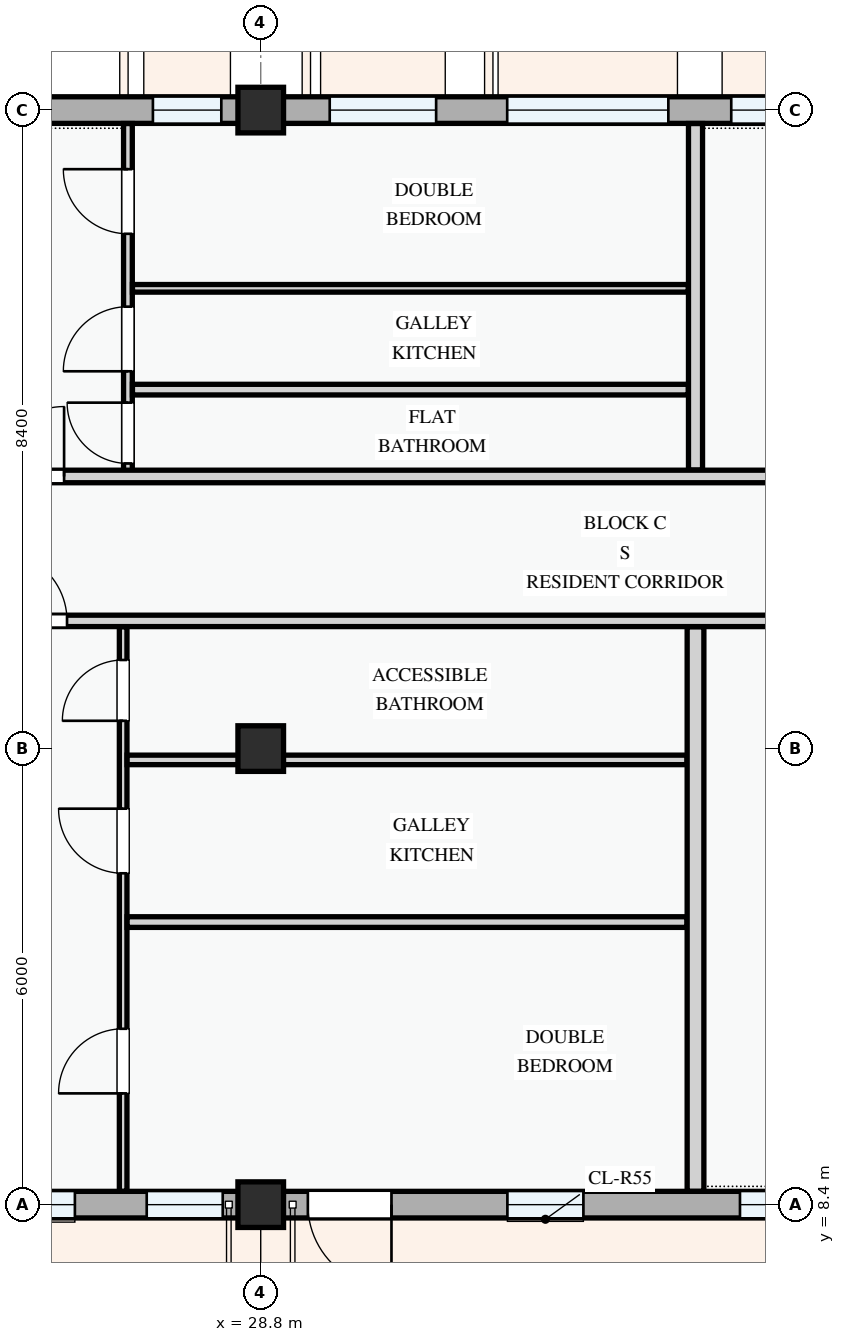
"""IFC4 building model, lengths in metres.
Left out: names, types, materials, properties, quantities, classifications, styles, units other than length and angle.
Written with IfcOpenShell. Run it as: python <this file> out.ifc"""

import sys

from ifc_helpers import new_model, si_unit, direction, frame, frame_2d, origin, origin_2d, place, context, subcontext, project, spatial, rectangle, extrude, element, fill, save


model = new_model("IFC4")
c1 = context("Model", 3, precision=1e-05, world=origin(), true_north=direction((0.0, 1.0)))
c2 = subcontext(c1, "Body", "Model", "MODEL_VIEW")
j1 = project(units=[si_unit("LENGTHUNIT", "METRE"), si_unit("PLANEANGLEUNIT", "RADIAN")], contexts=[c1])
p1 = place(None, origin())
s1 = spatial("IfcSite", under=j1, at=p1, CompositionType="ELEMENT")
p2 = place(p1, origin())
s2 = spatial("IfcBuilding", under=s1, at=p2, CompositionType="ELEMENT")
p3 = place(p2, frame((0.0, 0.0, 8.1)))
s3 = spatial("IfcBuildingStorey", under=s2, at=p3, CompositionType="ELEMENT", Elevation=8.1)
for number, where, z_axis, x_axis in (
    (1, (28.8, 8.4, 0.0), (0.0, 0.0, 1.0), (1.0, 0.0, 0.0)),
    (2, (28.8, 14.4, 0.0), (0.0, 0.0, 1.0), (1.0, 0.0, 0.0)),
    (3, (28.8, 22.8, 0.0), (0.0, 0.0, 1.0), (1.0, 0.0, 0.0)),
):
    element("IfcColumn", number, at=place(p3, frame(where, z_axis=z_axis, x_axis=x_axis)), inside=s3, PredefinedType="COLUMN", context=c2, shape_type="SweptSolid", body=[
        extrude(rectangle(XDim=0.6, YDim=0.6, at=origin_2d()), origin(), (0.0, 0.0, 1.0), 3.3),
    ])
p4 = place(p3, frame((22.8, 8.4, 0.0), z_axis=(0.0, 0.0, 1.0), x_axis=(1.0, 0.0, 0.0)))
e4 = element("IfcWall", 4, at=p4, inside=s3, PredefinedType="STANDARD", context=c2, shape_type="SweptSolid", body=[
    extrude(rectangle(XDim=6.0, YDim=0.35, at=frame_2d((3.0, 0.0))), origin(), (0.0, 0.0, 1.0), 2.475),
])
p5 = place(p4, frame((0.62, 0.0, 0.0)))
e5 = element("IfcOpeningElement", 5, at=p5, cuts=e4, PredefinedType="OPENING", context=c2, shape_type="SweptSolid", body=[
    extrude(rectangle(XDim=1.05, YDim=2.15, at=frame_2d((0.525, 1.075))), frame((0.0, 0.185, 0.0), z_axis=(0.0, -1.0, 0.0), x_axis=(1.0, 0.0, 0.0)), (0.0, 0.0, 1.0), 0.37),
])
p6 = place(p4, frame((2.355, 0.0, 0.78)))
e6 = element("IfcOpeningElement", 6, at=p6, cuts=e4, PredefinedType="OPENING", context=c2, shape_type="SweptSolid", body=[
    extrude(rectangle(XDim=1.2, YDim=1.5, at=frame_2d((0.6, 0.75))), frame((0.0, 0.185, 0.0), z_axis=(0.0, -1.0, 0.0), x_axis=(1.0, 0.0, 0.0)), (0.0, 0.0, 1.0), 0.37),
])
p7 = place(p4, frame((4.5, 0.0, 0.78)))
e7 = element("IfcOpeningElement", 7, at=p7, cuts=e4, PredefinedType="OPENING", context=c2, shape_type="SweptSolid", body=[
    extrude(rectangle(XDim=1.0, YDim=1.25, at=frame_2d((0.5, 0.625))), frame((0.0, 0.185, 0.0), z_axis=(0.0, -1.0, 0.0), x_axis=(1.0, 0.0, 0.0)), (0.0, 0.0, 1.0), 0.37),
])
p8 = place(p3, frame((28.8, 8.4, 0.0), z_axis=(0.0, 0.0, 1.0), x_axis=(1.0, 0.0, 0.0)))
e8 = element("IfcWall", 8, at=p8, inside=s3, PredefinedType="STANDARD", context=c2, shape_type="SweptSolid", body=[
    extrude(rectangle(XDim=8.4, YDim=0.35, at=frame_2d((4.2, 0.0))), origin(), (0.0, 0.0, 1.0), 2.375),
])
p9 = place(p8, frame((0.62, 0.0, 0.0)))
e9 = element("IfcOpeningElement", 9, at=p9, cuts=e8, PredefinedType="OPENING", context=c2, shape_type="SweptSolid", body=[
    extrude(rectangle(XDim=1.1, YDim=2.15, at=frame_2d((0.55, 1.075))), frame((0.0, 0.185, 0.0), z_axis=(0.0, -1.0, 0.0), x_axis=(1.0, 0.0, 0.0)), (0.0, 0.0, 1.0), 0.37),
])
p10 = place(p8, frame((3.245, 0.0, 0.78)))
e10 = element("IfcOpeningElement", 10, at=p10, cuts=e8, PredefinedType="OPENING", context=c2, shape_type="SweptSolid", body=[
    extrude(rectangle(XDim=1.0, YDim=1.25, at=frame_2d((0.5, 0.625))), frame((0.0, 0.185, 0.0), z_axis=(0.0, -1.0, 0.0), x_axis=(1.0, 0.0, 0.0)), (0.0, 0.0, 1.0), 0.37),
])
p11 = place(p8, frame((6.305, 0.0, 0.78)))
e11 = element("IfcOpeningElement", 11, at=p11, cuts=e8, PredefinedType="OPENING", context=c2, shape_type="SweptSolid", body=[
    extrude(rectangle(XDim=1.32, YDim=1.35, at=frame_2d((0.66, 0.675))), frame((0.0, 0.185, 0.0), z_axis=(0.0, -1.0, 0.0), x_axis=(1.0, 0.0, 0.0)), (0.0, 0.0, 1.0), 0.37),
])
p12 = place(p3, frame((37.2, 22.8, 0.0), z_axis=(0.0, 0.0, 1.0), x_axis=(-1.0, 0.0, 0.0)))
e12 = element("IfcWall", 12, at=p12, inside=s3, PredefinedType="STANDARD", context=c2, shape_type="SweptSolid", body=[
    extrude(rectangle(XDim=8.4, YDim=0.35, at=frame_2d((4.2, 0.0))), origin(), (0.0, 0.0, 1.0), 2.375),
])
p13 = place(p12, frame((0.66, 0.0, 0.78)))
e13 = element("IfcOpeningElement", 13, at=p13, cuts=e12, PredefinedType="OPENING", context=c2, shape_type="SweptSolid", body=[
    extrude(rectangle(XDim=1.55, YDim=1.4, at=frame_2d((0.775, 0.7))), frame((0.0, 0.185, 0.0), z_axis=(0.0, -1.0, 0.0), x_axis=(1.0, 0.0, 0.0)), (0.0, 0.0, 1.0), 0.37),
])
p14 = place(p12, frame((3.038, 0.0, 0.78)))
e14 = element("IfcOpeningElement", 14, at=p14, cuts=e12, PredefinedType="OPENING", context=c2, shape_type="SweptSolid", body=[
    extrude(rectangle(XDim=2.12, YDim=1.44, at=frame_2d((1.06, 0.72))), frame((0.0, 0.185, 0.0), z_axis=(0.0, -1.0, 0.0), x_axis=(1.0, 0.0, 0.0)), (0.0, 0.0, 1.0), 0.37),
])
p15 = place(p12, frame((6.093, 0.0, 0.78)))
e15 = element("IfcOpeningElement", 15, at=p15, cuts=e12, PredefinedType="OPENING", context=c2, shape_type="SweptSolid", body=[
    extrude(rectangle(XDim=1.4, YDim=1.45, at=frame_2d((0.7, 0.725))), frame((0.0, 0.185, 0.0), z_axis=(0.0, -1.0, 0.0), x_axis=(1.0, 0.0, 0.0)), (0.0, 0.0, 1.0), 0.37),
])
p16 = place(p3, frame((28.8, 22.8, 0.0), z_axis=(0.0, 0.0, 1.0), x_axis=(-1.0, 0.0, 0.0)))
e16 = element("IfcWall", 16, at=p16, inside=s3, PredefinedType="STANDARD", context=c2, shape_type="SweptSolid", body=[
    extrude(rectangle(XDim=6.0, YDim=0.35, at=frame_2d((3.0, 0.0))), origin(), (0.0, 0.0, 1.0), 2.475),
])
p17 = place(p16, frame((0.519, 0.0, 0.78)))
e17 = element("IfcOpeningElement", 17, at=p17, cuts=e16, PredefinedType="OPENING", context=c2, shape_type="SweptSolid", body=[
    extrude(rectangle(XDim=0.9, YDim=1.2, at=frame_2d((0.45, 0.6))), frame((0.0, 0.185, 0.0), z_axis=(0.0, -1.0, 0.0), x_axis=(1.0, 0.0, 0.0)), (0.0, 0.0, 1.0), 0.37),
])
p18 = place(p16, frame((3.004, 0.0, 0.78)))
e18 = element("IfcOpeningElement", 18, at=p18, cuts=e16, PredefinedType="OPENING", context=c2, shape_type="SweptSolid", body=[
    extrude(rectangle(XDim=1.55, YDim=1.4, at=frame_2d((0.775, 0.7))), frame((0.0, 0.185, 0.0), z_axis=(0.0, -1.0, 0.0), x_axis=(1.0, 0.0, 0.0)), (0.0, 0.0, 1.0), 0.37),
])
p19 = place(p3, frame((26.99, 8.577, 0.0), z_axis=(0.0, 0.0, 1.0), x_axis=(0.0, 1.0, 0.0)))
e19 = element("IfcWall", 19, at=p19, inside=s3, PredefinedType="PARTITIONING", context=c2, shape_type="SweptSolid", body=[
    extrude(rectangle(XDim=7.426, YDim=0.1, at=frame_2d((3.713, 0.0))), origin(), (0.0, 0.0, 1.0), 3.0),
])
p20 = place(p19, frame((1.287, 0.0, 0.0)))
e20 = element("IfcOpeningElement", 20, at=p20, cuts=e19, PredefinedType="OPENING", context=c2, shape_type="SweptSolid", body=[
    extrude(rectangle(XDim=0.85, YDim=2.1, at=frame_2d((0.425, 1.05))), frame((0.0, 0.06, 0.0), z_axis=(0.0, -1.0, 0.0), x_axis=(1.0, 0.0, 0.0)), (0.0, 0.0, 1.0), 0.12),
])
p21 = place(p19, frame((4.182, 0.0, 0.0)))
e21 = element("IfcOpeningElement", 21, at=p21, cuts=e19, PredefinedType="OPENING", context=c2, shape_type="SweptSolid", body=[
    extrude(rectangle(XDim=0.85, YDim=2.1, at=frame_2d((0.425, 1.05))), frame((0.0, 0.06, 0.0), z_axis=(0.0, -1.0, 0.0), x_axis=(1.0, 0.0, 0.0)), (0.0, 0.0, 1.0), 0.12),
])
p22 = place(p19, frame((6.189, 0.0, 0.0)))
e22 = element("IfcOpeningElement", 22, at=p22, cuts=e19, PredefinedType="OPENING", context=c2, shape_type="SweptSolid", body=[
    extrude(rectangle(XDim=0.8, YDim=2.1, at=frame_2d((0.4, 1.05))), frame((0.0, 0.06, 0.0), z_axis=(0.0, -1.0, 0.0), x_axis=(1.0, 0.0, 0.0)), (0.0, 0.0, 1.0), 0.12),
])
p23 = place(p3, frame((27.042, 12.118, 0.0), z_axis=(0.0, 0.0, 1.0), x_axis=(1.0, 0.0, 0.0)))
e23 = element("IfcWall", 23, at=p23, inside=s3, PredefinedType="PARTITIONING", context=c2, shape_type="SweptSolid", body=[
    extrude(rectangle(XDim=7.366, YDim=0.14, at=frame_2d((3.683, 0.0))), origin(), (0.0, 0.0, 1.0), 3.0),
])
p24 = place(p3, frame((27.042, 14.251, 0.0), z_axis=(0.0, 0.0, 1.0), x_axis=(1.0, 0.0, 0.0)))
e24 = element("IfcWall", 24, at=p24, inside=s3, PredefinedType="PARTITIONING", context=c2, shape_type="SweptSolid", body=[
    extrude(rectangle(XDim=7.366, YDim=0.125, at=frame_2d((3.683, 0.0))), origin(), (0.0, 0.0, 1.0), 2.375),
])
p25 = place(p3, frame((27.053, 17.98, 0.0), z_axis=(0.0, 0.0, 1.0), x_axis=(0.0, 1.0, 0.0)))
e25 = element("IfcWall", 25, at=p25, inside=s3, PredefinedType="PARTITIONING", context=c2, shape_type="SweptSolid", body=[
    extrude(rectangle(XDim=4.643, YDim=0.115, at=frame_2d((2.322, 0.0))), origin(), (0.0, 0.0, 1.0), 3.0),
])
p26 = place(p25, frame((0.171, 0.0, 0.0)))
e26 = element("IfcOpeningElement", 26, at=p26, cuts=e25, PredefinedType="OPENING", context=c2, shape_type="SweptSolid", body=[
    extrude(rectangle(XDim=0.8, YDim=2.1, at=frame_2d((0.4, 1.05))), frame((0.0, 0.067, 0.0), z_axis=(0.0, -1.0, 0.0), x_axis=(1.0, 0.0, 0.0)), (0.0, 0.0, 1.0), 0.135),
])
p27 = place(p25, frame((1.384, 0.0, 0.0)))
e27 = element("IfcOpeningElement", 27, at=p27, cuts=e25, PredefinedType="OPENING", context=c2, shape_type="SweptSolid", body=[
    extrude(rectangle(XDim=0.85, YDim=2.1, at=frame_2d((0.425, 1.05))), frame((0.0, 0.067, 0.0), z_axis=(0.0, -1.0, 0.0), x_axis=(1.0, 0.0, 0.0)), (0.0, 0.0, 1.0), 0.135),
])
p28 = place(p25, frame((3.193, 0.0, 0.0)))
e28 = element("IfcOpeningElement", 28, at=p28, cuts=e25, PredefinedType="OPENING", context=c2, shape_type="SweptSolid", body=[
    extrude(rectangle(XDim=0.85, YDim=2.1, at=frame_2d((0.425, 1.05))), frame((0.0, 0.067, 0.0), z_axis=(0.0, -1.0, 0.0), x_axis=(1.0, 0.0, 0.0)), (0.0, 0.0, 1.0), 0.135),
])
p29 = place(p3, frame((27.112, 20.455, 0.0), z_axis=(0.0, 0.0, 1.0), x_axis=(1.0, 0.0, 0.0)))
e29 = element("IfcWall", 29, at=p29, inside=s3, PredefinedType="PARTITIONING", context=c2, shape_type="SweptSolid", body=[
    extrude(rectangle(XDim=7.313, YDim=0.1, at=frame_2d((3.657, 0.0))), origin(), (0.0, 0.0, 1.0), 3.0),
])
p30 = place(p3, frame((27.112, 19.122, 0.0), z_axis=(0.0, 0.0, 1.0), x_axis=(1.0, 0.0, 0.0)))
e30 = element("IfcWall", 30, at=p30, inside=s3, PredefinedType="PARTITIONING", context=c2, shape_type="SweptSolid", body=[
    extrude(rectangle(XDim=7.313, YDim=0.14, at=frame_2d((3.657, 0.0))), origin(), (0.0, 0.0, 1.0), 3.0),
])
p31 = place(p3, frame((34.52, 8.577, 0.0), z_axis=(0.0, 0.0, 1.0), x_axis=(0.0, 1.0, 0.0)))
e31 = element("IfcWall", 31, at=p31, inside=s3, PredefinedType="PARTITIONING", context=c2, shape_type="SweptSolid", body=[
    extrude(rectangle(XDim=7.426, YDim=0.22, at=frame_2d((3.713, 0.0))), origin(), (0.0, 0.0, 1.0), 3.0),
])
p32 = place(p3, frame((34.52, 18.064, 0.0), z_axis=(0.0, 0.0, 1.0), x_axis=(0.0, 1.0, 0.0)))
e32 = element("IfcWall", 32, at=p32, inside=s3, PredefinedType="PARTITIONING", context=c2, shape_type="SweptSolid", body=[
    extrude(rectangle(XDim=4.559, YDim=0.185, at=frame_2d((2.279, 0.0))), origin(), (0.0, 0.0, 1.0), 3.0),
])
p33 = place(p3, frame((22.66, 16.08, 0.0), z_axis=(0.0, 0.0, 1.0), x_axis=(1.0, 0.0, 0.0)))
e33 = element("IfcWall", 33, at=p33, inside=s3, PredefinedType="PARTITIONING", context=c2, shape_type="SweptSolid", body=[
    extrude(rectangle(XDim=34.763, YDim=0.15, at=frame_2d((17.382, 0.0))), origin(), (0.0, 0.0, 1.0), 3.0),
])
p34 = place(p33, frame((2.672, 0.0, 0.0)))
e34 = element("IfcOpeningElement", 34, at=p34, cuts=e33, PredefinedType="OPENING", context=c2, shape_type="SweptSolid", body=[
    extrude(rectangle(XDim=0.92, YDim=2.1, at=frame_2d((0.46, 1.05))), frame((0.0, 0.085, 0.0), z_axis=(0.0, -1.0, 0.0), x_axis=(1.0, 0.0, 0.0)), (0.0, 0.0, 1.0), 0.17),
])
p35 = place(p33, frame((16.58, 0.0, 0.0)))
e35 = element("IfcOpeningElement", 35, at=p35, cuts=e33, PredefinedType="OPENING", context=c2, shape_type="SweptSolid", body=[
    extrude(rectangle(XDim=0.96, YDim=2.12, at=frame_2d((0.48, 1.06))), frame((0.0, 0.085, 0.0), z_axis=(0.0, -1.0, 0.0), x_axis=(1.0, 0.0, 0.0)), (0.0, 0.0, 1.0), 0.17),
])
p36 = place(p33, frame((24.315, 0.0, 0.0)))
e36 = element("IfcOpeningElement", 36, at=p36, cuts=e33, PredefinedType="OPENING", context=c2, shape_type="SweptSolid", body=[
    extrude(rectangle(XDim=0.92, YDim=2.1, at=frame_2d((0.46, 1.05))), frame((0.0, 0.085, 0.0), z_axis=(0.0, -1.0, 0.0), x_axis=(1.0, 0.0, 0.0)), (0.0, 0.0, 1.0), 0.17),
])
p37 = place(p3, frame((22.66, 17.98, 0.0), z_axis=(0.0, 0.0, 1.0), x_axis=(1.0, 0.0, 0.0)))
e37 = element("IfcWall", 37, at=p37, inside=s3, PredefinedType="PARTITIONING", context=c2, shape_type="SweptSolid", body=[
    extrude(rectangle(XDim=34.763, YDim=0.165, at=frame_2d((17.382, 0.0))), origin(), (0.0, 0.0, 1.0), 3.0),
])
p38 = place(p37, frame((2.633, 0.0, 0.0)))
e38 = element("IfcOpeningElement", 38, at=p38, cuts=e37, PredefinedType="OPENING", context=c2, shape_type="SweptSolid", body=[
    extrude(rectangle(XDim=0.92, YDim=2.1, at=frame_2d((0.46, 1.05))), frame((0.0, 0.093, 0.0), z_axis=(0.0, -1.0, 0.0), x_axis=(1.0, 0.0, 0.0)), (0.0, 0.0, 1.0), 0.185),
])
p39 = place(p37, frame((16.343, 0.0, 0.0)))
e39 = element("IfcOpeningElement", 39, at=p39, cuts=e37, PredefinedType="OPENING", context=c2, shape_type="SweptSolid", body=[
    extrude(rectangle(XDim=0.92, YDim=2.1, at=frame_2d((0.46, 1.05))), frame((0.0, 0.093, 0.0), z_axis=(0.0, -1.0, 0.0), x_axis=(1.0, 0.0, 0.0)), (0.0, 0.0, 1.0), 0.185),
])
p40 = place(p37, frame((24.313, 0.0, 0.0)))
e40 = element("IfcOpeningElement", 40, at=p40, cuts=e37, PredefinedType="OPENING", context=c2, shape_type="SweptSolid", body=[
    extrude(rectangle(XDim=0.92, YDim=2.1, at=frame_2d((0.46, 1.05))), frame((0.0, 0.093, 0.0), z_axis=(0.0, -1.0, 0.0), x_axis=(1.0, 0.0, 0.0)), (0.0, 0.0, 1.0), 0.185),
])
p41 = place(p6, origin())
e41 = element("IfcWindow", 41, at=p41, inside=s3, PartitioningType="SINGLE_PANEL", PredefinedType="WINDOW", context=c2, shape_type="SweptSolid", body=[
    extrude(rectangle(XDim=1.2, YDim=1.5, at=frame_2d((0.6, 0.75))), frame((0.0, 0.03, 0.0), z_axis=(0.0, -1.0, 0.0), x_axis=(1.0, 0.0, 0.0)), (0.0, 0.0, 1.0), 0.06),
])
fill(e6, e41)
p42 = place(p7, origin())
e42 = element("IfcWindow", 42, at=p42, inside=s3, PartitioningType="SINGLE_PANEL", PredefinedType="WINDOW", context=c2, shape_type="SweptSolid", body=[
    extrude(rectangle(XDim=1.0, YDim=1.25, at=frame_2d((0.5, 0.625))), frame((0.0, 0.03, 0.0), z_axis=(0.0, -1.0, 0.0), x_axis=(1.0, 0.0, 0.0)), (0.0, 0.0, 1.0), 0.06),
])
fill(e7, e42)
p43 = place(p9, frame((1.1, 0.0, 0.0), z_axis=(0.0, 0.0, 1.0), x_axis=(-1.0, 0.0, 0.0)))
e43 = element("IfcDoor", 43, at=p43, inside=s3, OperationType="SINGLE_SWING_LEFT", PredefinedType="DOOR", context=c2, shape_type="SweptSolid", body=[
    extrude(rectangle(XDim=1.1, YDim=2.15, at=frame_2d((0.55, 1.075))), frame((0.0, 0.025, 0.0), z_axis=(0.0, -1.0, 0.0), x_axis=(1.0, 0.0, 0.0)), (0.0, 0.0, 1.0), 0.05),
])
fill(e9, e43)
p44 = place(p10, origin())
e44 = element("IfcWindow", 44, at=p44, inside=s3, PartitioningType="SINGLE_PANEL", PredefinedType="WINDOW", context=c2, shape_type="SweptSolid", body=[
    extrude(rectangle(XDim=1.0, YDim=1.25, at=frame_2d((0.5, 0.625))), frame((0.0, 0.03, 0.0), z_axis=(0.0, -1.0, 0.0), x_axis=(1.0, 0.0, 0.0)), (0.0, 0.0, 1.0), 0.06),
])
fill(e10, e44)
p45 = place(p11, origin())
e45 = element("IfcWindow", 45, at=p45, inside=s3, PartitioningType="SINGLE_PANEL", PredefinedType="WINDOW", context=c2, shape_type="SweptSolid", body=[
    extrude(rectangle(XDim=1.32, YDim=1.35, at=frame_2d((0.66, 0.675))), frame((0.0, 0.03, 0.0), z_axis=(0.0, -1.0, 0.0), x_axis=(1.0, 0.0, 0.0)), (0.0, 0.0, 1.0), 0.06),
])
fill(e11, e45)
p46 = place(p13, origin())
e46 = element("IfcWindow", 46, at=p46, inside=s3, PartitioningType="SINGLE_PANEL", PredefinedType="WINDOW", context=c2, shape_type="SweptSolid", body=[
    extrude(rectangle(XDim=1.55, YDim=1.4, at=frame_2d((0.775, 0.7))), frame((0.0, 0.03, 0.0), z_axis=(0.0, -1.0, 0.0), x_axis=(1.0, 0.0, 0.0)), (0.0, 0.0, 1.0), 0.06),
])
fill(e13, e46)
p47 = place(p14, origin())
e47 = element("IfcWindow", 47, at=p47, inside=s3, PartitioningType="DOUBLE_PANEL_VERTICAL", PredefinedType="WINDOW", context=c2, shape_type="SweptSolid", body=[
    extrude(rectangle(XDim=2.12, YDim=1.44, at=frame_2d((1.06, 0.72))), frame((0.0, 0.03, 0.0), z_axis=(0.0, -1.0, 0.0), x_axis=(1.0, 0.0, 0.0)), (0.0, 0.0, 1.0), 0.06),
])
fill(e14, e47)
p48 = place(p15, origin())
e48 = element("IfcWindow", 48, at=p48, inside=s3, PartitioningType="SINGLE_PANEL", PredefinedType="WINDOW", context=c2, shape_type="SweptSolid", body=[
    extrude(rectangle(XDim=1.4, YDim=1.45, at=frame_2d((0.7, 0.725))), frame((0.0, 0.03, 0.0), z_axis=(0.0, -1.0, 0.0), x_axis=(1.0, 0.0, 0.0)), (0.0, 0.0, 1.0), 0.06),
])
fill(e15, e48)
p49 = place(p17, origin())
e49 = element("IfcWindow", 49, at=p49, inside=s3, PartitioningType="SINGLE_PANEL", PredefinedType="WINDOW", context=c2, shape_type="SweptSolid", body=[
    extrude(rectangle(XDim=0.9, YDim=1.2, at=frame_2d((0.45, 0.6))), frame((0.0, 0.03, 0.0), z_axis=(0.0, -1.0, 0.0), x_axis=(1.0, 0.0, 0.0)), (0.0, 0.0, 1.0), 0.06),
])
fill(e17, e49)
p50 = place(p20, origin())
e50 = element("IfcDoor", 50, at=p50, inside=s3, OperationType="SINGLE_SWING_LEFT", PredefinedType="DOOR", context=c2, shape_type="SweptSolid", body=[
    extrude(rectangle(XDim=0.85, YDim=2.1, at=frame_2d((0.425, 1.05))), frame((0.0, 0.025, 0.0), z_axis=(0.0, -1.0, 0.0), x_axis=(1.0, 0.0, 0.0)), (0.0, 0.0, 1.0), 0.05),
])
fill(e20, e50)
p51 = place(p21, origin())
e51 = element("IfcDoor", 51, at=p51, inside=s3, OperationType="SINGLE_SWING_RIGHT", PredefinedType="DOOR", context=c2, shape_type="SweptSolid", body=[
    extrude(rectangle(XDim=0.85, YDim=2.1, at=frame_2d((0.425, 1.05))), frame((0.0, 0.025, 0.0), z_axis=(0.0, -1.0, 0.0), x_axis=(1.0, 0.0, 0.0)), (0.0, 0.0, 1.0), 0.05),
])
fill(e21, e51)
p52 = place(p22, origin())
e52 = element("IfcDoor", 52, at=p52, inside=s3, OperationType="SINGLE_SWING_LEFT", PredefinedType="DOOR", context=c2, shape_type="SweptSolid", body=[
    extrude(rectangle(XDim=0.8, YDim=2.1, at=frame_2d((0.4, 1.05))), frame((0.0, 0.025, 0.0), z_axis=(0.0, -1.0, 0.0), x_axis=(1.0, 0.0, 0.0)), (0.0, 0.0, 1.0), 0.05),
])
fill(e22, e52)
p53 = place(p26, origin())
e53 = element("IfcDoor", 53, at=p53, inside=s3, OperationType="SINGLE_SWING_RIGHT", PredefinedType="DOOR", context=c2, shape_type="SweptSolid", body=[
    extrude(rectangle(XDim=0.8, YDim=2.1, at=frame_2d((0.4, 1.05))), frame((0.0, 0.025, 0.0), z_axis=(0.0, -1.0, 0.0), x_axis=(1.0, 0.0, 0.0)), (0.0, 0.0, 1.0), 0.05),
])
fill(e26, e53)
p54 = place(p27, origin())
e54 = element("IfcDoor", 54, at=p54, inside=s3, OperationType="SINGLE_SWING_LEFT", PredefinedType="DOOR", context=c2, shape_type="SweptSolid", body=[
    extrude(rectangle(XDim=0.85, YDim=2.1, at=frame_2d((0.425, 1.05))), frame((0.0, 0.025, 0.0), z_axis=(0.0, -1.0, 0.0), x_axis=(1.0, 0.0, 0.0)), (0.0, 0.0, 1.0), 0.05),
])
fill(e27, e54)
p55 = place(p28, origin())
e55 = element("IfcDoor", 55, at=p55, inside=s3, OperationType="SINGLE_SWING_RIGHT", PredefinedType="DOOR", context=c2, shape_type="SweptSolid", body=[
    extrude(rectangle(XDim=0.85, YDim=2.1, at=frame_2d((0.425, 1.05))), frame((0.0, 0.025, 0.0), z_axis=(0.0, -1.0, 0.0), x_axis=(1.0, 0.0, 0.0)), (0.0, 0.0, 1.0), 0.05),
])
fill(e28, e55)
p56 = place(p34, origin())
e56 = element("IfcDoor", 56, at=p56, inside=s3, OperationType="SINGLE_SWING_LEFT", PredefinedType="DOOR", context=c2, shape_type="SweptSolid", body=[
    extrude(rectangle(XDim=0.92, YDim=2.1, at=frame_2d((0.46, 1.05))), frame((0.0, 0.025, 0.0), z_axis=(0.0, -1.0, 0.0), x_axis=(1.0, 0.0, 0.0)), (0.0, 0.0, 1.0), 0.05),
])
fill(e34, e56)
p57 = place(p38, origin())
e57 = element("IfcDoor", 57, at=p57, inside=s3, OperationType="SINGLE_SWING_RIGHT", PredefinedType="DOOR", context=c2, shape_type="SweptSolid", body=[
    extrude(rectangle(XDim=0.92, YDim=2.1, at=frame_2d((0.46, 1.05))), frame((0.0, 0.025, 0.0), z_axis=(0.0, -1.0, 0.0), x_axis=(1.0, 0.0, 0.0)), (0.0, 0.0, 1.0), 0.05),
])
fill(e38, e57)
save(model, sys.argv[1])
